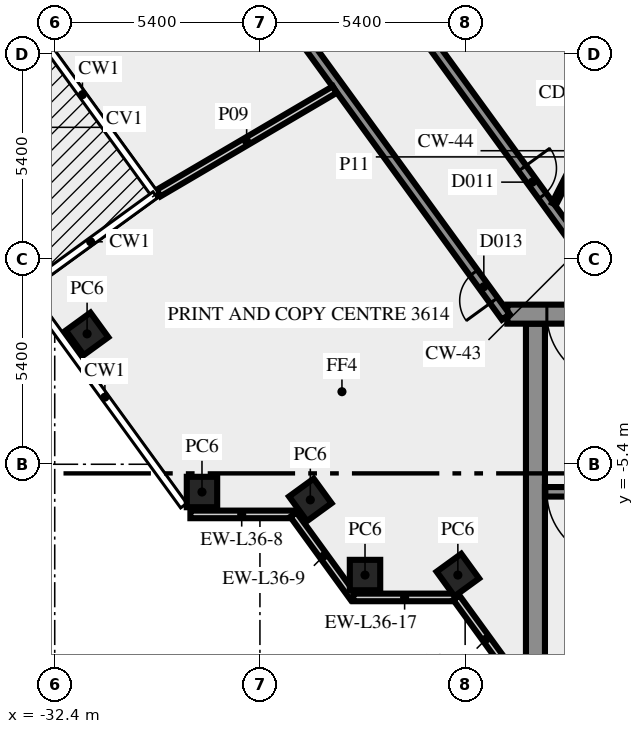
"""IFC4 building model, lengths in metres.
Left out: names, types, materials, properties, quantities, classifications, styles, units other than length and angle.
Written with IfcOpenShell. Run it as: python <this file> out.ifc"""

import sys

from ifc_helpers import new_model, si_unit, direction, frame, frame_2d, origin, origin_2d, place, context, subcontext, project, spatial, rectangle, extrude, element, fill, save


model = new_model("IFC4")
c1 = context("Model", 3, precision=1e-05, world=origin(), true_north=direction((0.0, 1.0)))
c2 = subcontext(c1, "Body", "Model", "MODEL_VIEW")
j1 = project(units=[si_unit("LENGTHUNIT", "METRE"), si_unit("PLANEANGLEUNIT", "RADIAN")], contexts=[c1])
p1 = place(None, origin())
s1 = spatial("IfcSite", under=j1, at=p1, CompositionType="ELEMENT")
p2 = place(p1, origin())
s2 = spatial("IfcBuilding", under=s1, at=p2, CompositionType="ELEMENT")
p3 = place(p2, frame((0.0, 0.0, 156.0)))
s3 = spatial("IfcBuildingStorey", under=s2, at=p3, CompositionType="ELEMENT", Elevation=156.0)
for number, where, z_axis, x_axis in (
    (1, (-31.548, -1.969, 0.0), (0.0, 0.0, 1.0), (0.588, -0.809, 0.0)),
    (2, (-28.525, -6.13, 0.0), (0.0, 0.0, 1.0), (1.0, 0.0, 0.0)),
    (3, (-25.674, -6.337, 0.0), (0.0, 0.0, 1.0), (0.588, -0.809, 0.0)),
    (4, (-24.235, -8.315, 0.0), (0.0, 0.0, 1.0), (1.0, 0.0, 0.0)),
    (5, (-21.792, -8.315, 0.0), (0.0, 0.0, 1.0), (0.588, -0.809, 0.0)),
):
    element("IfcColumn", number, at=place(p3, frame(where, z_axis=z_axis, x_axis=x_axis)), inside=s3, PredefinedType="COLUMN", context=c2, shape_type="SweptSolid", body=[
        extrude(rectangle(XDim=0.8, YDim=0.8, at=origin_2d()), origin(), (0.0, 0.0, 1.0), 3.65),
    ])
p4 = place(p3, frame((-28.83, -6.719, 0.0), z_axis=(0.0, 0.0, 1.0), x_axis=(1.0, 0.0, 0.0)))
e6 = element("IfcWall", 6, at=p4, inside=s3, PredefinedType="SOLIDWALL", context=c2, shape_type="SweptSolid", body=[
    extrude(rectangle(XDim=2.7, YDim=0.2, at=frame_2d((1.35, 0.0))), origin(), (0.0, 0.0, 1.0), 3.65),
])
p5 = place(p3, frame((-26.12, -6.724, 0.0), z_axis=(0.0, 0.0, 1.0), x_axis=(0.587720002413, -0.809064397168, 0.0)))
e7 = element("IfcWall", 7, at=p5, inside=s3, PredefinedType="SOLIDWALL", context=c2, shape_type="SweptSolid", body=[
    extrude(rectangle(XDim=2.7, YDim=0.2, at=frame_2d((1.35, 0.0))), origin(), (0.0, 0.0, 1.0), 3.65),
])
p6 = place(p3, frame((-24.543, -8.904, 0.0), z_axis=(0.0, 0.0, 1.0), x_axis=(1.0, 0.0, 0.0)))
e8 = element("IfcWall", 8, at=p6, inside=s3, PredefinedType="SOLIDWALL", context=c2, shape_type="SweptSolid", body=[
    extrude(rectangle(XDim=2.7, YDim=0.2, at=frame_2d((1.35, 0.0))), origin(), (0.0, 0.0, 1.0), 3.65),
])
p7 = place(p3, frame((-21.833, -8.909, 0.0), z_axis=(0.0, 0.0, 1.0), x_axis=(0.587766567315, -0.809030569476, 0.0)))
e9 = element("IfcWall", 9, at=p7, inside=s3, PredefinedType="SOLIDWALL", context=c2, shape_type="SweptSolid", body=[
    extrude(rectangle(XDim=2.688, YDim=0.2, at=frame_2d((1.344, 0.0))), origin(), (0.0, 0.0, 1.0), 3.65),
])
p8 = place(p3, frame((-19.75, -10.5, 0.0), z_axis=(0.0, 0.0, 1.0), x_axis=(0.0, 1.0, 0.0)))
e10 = element("IfcWall", 10, at=p8, inside=s3, PredefinedType="SHEAR", context=c2, shape_type="SweptSolid", body=[
    extrude(rectangle(XDim=8.8, YDim=0.5, at=frame_2d((4.4, 0.0))), origin(), (0.0, 0.0, 1.0), 3.65),
])
p9 = place(p3, frame((-11.45, -6.125, 0.0), z_axis=(0.0, 0.0, 1.0), x_axis=(-1.0, 0.0, 0.0)))
e11 = element("IfcWall", 11, at=p9, inside=s3, PredefinedType="SHEAR", context=c2, shape_type="SweptSolid", body=[
    extrude(rectangle(XDim=8.05, YDim=0.25, at=frame_2d((4.025, 0.0))), origin(), (0.0, 0.0, 1.0), 3.65),
])
p10 = place(p9, frame((6.2, 0.0, 0.0)))
e12 = element("IfcOpeningElement", 12, at=p10, cuts=e11, PredefinedType="OPENING", context=c2, shape_type="SweptSolid", body=[
    extrude(rectangle(XDim=1.8, YDim=2.1, at=frame_2d((0.9, 1.05))), frame((0.0, 0.135, 0.0), z_axis=(0.0, -1.0, 0.0), x_axis=(1.0, 0.0, 0.0)), (0.0, 0.0, 1.0), 0.27),
])
p11 = place(p3, frame((20.49, -1.45, 0.0), z_axis=(0.0, 0.0, 1.0), x_axis=(-1.0, 0.0, 0.0)))
e13 = element("IfcWall", 13, at=p11, inside=s3, PredefinedType="SHEAR", context=c2, shape_type="SweptSolid", body=[
    extrude(rectangle(XDim=40.98, YDim=0.5, at=frame_2d((20.49, 0.0))), origin(), (0.0, 0.0, 1.0), 3.65),
])
p12 = place(p11, frame((38.14, 0.0, 0.0)))
e14 = element("IfcOpeningElement", 14, at=p12, cuts=e13, PredefinedType="OPENING", context=c2, shape_type="SweptSolid", body=[
    extrude(rectangle(XDim=1.8, YDim=2.1, at=frame_2d((0.9, 1.05))), frame((0.0, 0.26, 0.0), z_axis=(0.0, -1.0, 0.0), x_axis=(1.0, 0.0, 0.0)), (0.0, 0.0, 1.0), 0.52),
])
p13 = place(p11, frame((35.89, 0.0, 0.0)))
e15 = element("IfcOpeningElement", 15, at=p13, cuts=e13, PredefinedType="OPENING", context=c2, shape_type="SweptSolid", body=[
    extrude(rectangle(XDim=0.9, YDim=2.1, at=frame_2d((0.45, 1.05))), frame((0.0, 0.26, 0.0), z_axis=(0.0, -1.0, 0.0), x_axis=(1.0, 0.0, 0.0)), (0.0, 0.0, 1.0), 0.52),
])
p14 = place(p11, frame((32.94, 0.0, 0.0)))
e16 = element("IfcOpeningElement", 16, at=p14, cuts=e13, PredefinedType="OPENING", context=c2, shape_type="SweptSolid", body=[
    extrude(rectangle(XDim=0.9, YDim=2.1, at=frame_2d((0.45, 1.05))), frame((0.0, 0.26, 0.0), z_axis=(0.0, -1.0, 0.0), x_axis=(1.0, 0.0, 0.0)), (0.0, 0.0, 1.0), 0.52),
])
p15 = place(p11, frame((28.802, 0.0, 0.0)))
e17 = element("IfcOpeningElement", 17, at=p15, cuts=e13, PredefinedType="OPENING", context=c2, shape_type="SweptSolid", body=[
    extrude(rectangle(XDim=0.9, YDim=2.1, at=frame_2d((0.45, 1.05))), frame((0.0, 0.26, 0.0), z_axis=(0.0, -1.0, 0.0), x_axis=(1.0, 0.0, 0.0)), (0.0, 0.0, 1.0), 0.52),
])
p16 = place(p11, frame((25.077, 0.0, 0.0)))
e18 = element("IfcOpeningElement", 18, at=p16, cuts=e13, PredefinedType="OPENING", context=c2, shape_type="SweptSolid", body=[
    extrude(rectangle(XDim=0.9, YDim=2.1, at=frame_2d((0.45, 1.05))), frame((0.0, 0.26, 0.0), z_axis=(0.0, -1.0, 0.0), x_axis=(1.0, 0.0, 0.0)), (0.0, 0.0, 1.0), 0.52),
])
p17 = place(p11, frame((21.765, 0.0, 0.0)))
e19 = element("IfcOpeningElement", 19, at=p17, cuts=e13, PredefinedType="OPENING", context=c2, shape_type="SweptSolid", body=[
    extrude(rectangle(XDim=2.0, YDim=2.1, at=frame_2d((1.0, 1.05))), frame((0.0, 0.26, 0.0), z_axis=(0.0, -1.0, 0.0), x_axis=(1.0, 0.0, 0.0)), (0.0, 0.0, 1.0), 0.52),
])
p18 = place(p11, frame((7.14, 0.0, 0.0)))
e20 = element("IfcOpeningElement", 20, at=p18, cuts=e13, PredefinedType="OPENING", context=c2, shape_type="SweptSolid", body=[
    extrude(rectangle(XDim=0.9, YDim=2.1, at=frame_2d((0.45, 1.05))), frame((0.0, 0.26, 0.0), z_axis=(0.0, -1.0, 0.0), x_axis=(1.0, 0.0, 0.0)), (0.0, 0.0, 1.0), 0.52),
])
p19 = place(p11, frame((5.028, 0.0, 0.0)))
e21 = element("IfcOpeningElement", 21, at=p19, cuts=e13, PredefinedType="OPENING", context=c2, shape_type="SweptSolid", body=[
    extrude(rectangle(XDim=0.8, YDim=2.1, at=frame_2d((0.4, 1.05))), frame((0.0, 0.26, 0.0), z_axis=(0.0, -1.0, 0.0), x_axis=(1.0, 0.0, 0.0)), (0.0, 0.0, 1.0), 0.52),
])
p20 = place(p11, frame((3.452, 0.0, 0.0)))
e22 = element("IfcOpeningElement", 22, at=p20, cuts=e13, PredefinedType="OPENING", context=c2, shape_type="SweptSolid", body=[
    extrude(rectangle(XDim=0.8, YDim=2.1, at=frame_2d((0.4, 1.05))), frame((0.0, 0.26, 0.0), z_axis=(0.0, -1.0, 0.0), x_axis=(1.0, 0.0, 0.0)), (0.0, 0.0, 1.0), 0.52),
])
p21 = place(p11, frame((1.04, 0.0, 0.0)))
e23 = element("IfcOpeningElement", 23, at=p21, cuts=e13, PredefinedType="OPENING", context=c2, shape_type="SweptSolid", body=[
    extrude(rectangle(XDim=1.8, YDim=2.1, at=frame_2d((0.9, 1.05))), frame((0.0, 0.26, 0.0), z_axis=(0.0, -1.0, 0.0), x_axis=(1.0, 0.0, 0.0)), (0.0, 0.0, 1.0), 0.52),
])
p22 = place(p3, frame((-20.531, -1.523, 0.0), z_axis=(0.0, 0.0, 1.0), x_axis=(-0.587781654618, 0.809019608226, 0.0)))
e24 = element("IfcWall", 24, at=p22, inside=s3, PredefinedType="SOLIDWALL", context=c2, shape_type="SweptSolid", body=[
    extrude(rectangle(XDim=33.911, YDim=0.25, at=frame_2d((16.956, 0.0))), origin(), (0.0, 0.0, 1.0), 3.65),
])
p23 = place(p22, frame((19.743, 0.0, 0.0)))
e25 = element("IfcOpeningElement", 25, at=p23, cuts=e24, PredefinedType="OPENING", context=c2, shape_type="SweptSolid", body=[
    extrude(rectangle(XDim=1.8, YDim=2.1, at=frame_2d((0.9, 1.05))), frame((0.0, 0.135, 0.0), z_axis=(0.0, -1.0, 0.0), x_axis=(1.0, 0.0, 0.0)), (0.0, 0.0, 1.0), 0.27),
])
p24 = place(p22, frame((0.533, 0.0, 0.0)))
e26 = element("IfcOpeningElement", 26, at=p24, cuts=e24, PredefinedType="OPENING", context=c2, shape_type="SweptSolid", body=[
    extrude(rectangle(XDim=0.9, YDim=2.1, at=frame_2d((0.45, 1.05))), frame((0.0, 0.135, 0.0), z_axis=(0.0, -1.0, 0.0), x_axis=(1.0, 0.0, 0.0)), (0.0, 0.0, 1.0), 0.27),
])
p25 = place(p3, frame((-38.32, 27.469, 0.0), z_axis=(0.0, 0.0, 1.0), x_axis=(0.587788021768, -0.809014982226, 0.0)))
e27 = element("IfcWall", 27, at=p25, inside=s3, PredefinedType="SOLIDWALL", context=c2, shape_type="SweptSolid", body=[
    extrude(rectangle(XDim=35.344, YDim=0.25, at=frame_2d((17.672, 0.0))), origin(), (0.0, 0.0, 1.0), 3.65),
])
p26 = place(p25, frame((31.003, 0.0, 0.0)))
e28 = element("IfcOpeningElement", 28, at=p26, cuts=e27, PredefinedType="OPENING", context=c2, shape_type="SweptSolid", body=[
    extrude(rectangle(XDim=0.9, YDim=2.1, at=frame_2d((0.45, 1.05))), frame((0.0, 0.135, 0.0), z_axis=(0.0, -1.0, 0.0), x_axis=(1.0, 0.0, 0.0)), (0.0, 0.0, 1.0), 0.27),
])
p27 = place(p25, frame((16.687, 0.0, 0.0)))
e29 = element("IfcOpeningElement", 29, at=p27, cuts=e27, PredefinedType="OPENING", context=c2, shape_type="SweptSolid", body=[
    extrude(rectangle(XDim=0.9, YDim=2.1, at=frame_2d((0.45, 1.05))), frame((0.0, 0.135, 0.0), z_axis=(0.0, -1.0, 0.0), x_axis=(1.0, 0.0, 0.0)), (0.0, 0.0, 1.0), 0.27),
])
p28 = place(p3, frame((-29.668, 1.735, 0.0), z_axis=(0.0, 0.0, 1.0), x_axis=(0.862172227296, 0.506615288439, 0.0)))
e30 = element("IfcWall", 30, at=p28, inside=s3, PredefinedType="SOLIDWALL", context=c2, shape_type="SweptSolid", body=[
    extrude(rectangle(XDim=5.377, YDim=0.2, at=frame_2d((2.688, 0.0))), origin(), (0.0, 0.0, 1.0), 3.65),
])
p29 = place(p3, frame((-19.261, 1.45, 0.0), z_axis=(0.0, 0.0, 1.0), x_axis=(0.453950796792, 0.891026752736, 0.0)))
e31 = element("IfcWall", 31, at=p29, inside=s3, PredefinedType="PARTITIONING", context=c2, shape_type="SweptSolid", body=[
    extrude(rectangle(XDim=2.778, YDim=0.12, at=frame_2d((1.389, 0.0))), origin(), (0.0, 0.0, 1.0), 3.65),
])
p30 = place(p10, origin())
e32 = element("IfcDoor", 32, at=p30, inside=s3, OperationType="DOUBLE_DOOR_SINGLE_SWING", PredefinedType="DOOR", context=c2, shape_type="SweptSolid", body=[
    extrude(rectangle(XDim=1.8, YDim=2.1, at=frame_2d((0.9, 1.05))), frame((0.0, 0.025, 0.0), z_axis=(0.0, -1.0, 0.0), x_axis=(1.0, 0.0, 0.0)), (0.0, 0.0, 1.0), 0.05),
])
fill(e12, e32)
p31 = place(p12, origin())
e33 = element("IfcDoor", 33, at=p31, inside=s3, OperationType="DOUBLE_DOOR_SINGLE_SWING", PredefinedType="DOOR", context=c2, shape_type="SweptSolid", body=[
    extrude(rectangle(XDim=1.8, YDim=2.1, at=frame_2d((0.9, 1.05))), frame((0.0, 0.025, 0.0), z_axis=(0.0, -1.0, 0.0), x_axis=(1.0, 0.0, 0.0)), (0.0, 0.0, 1.0), 0.05),
])
fill(e14, e33)
p32 = place(p26, origin())
e34 = element("IfcDoor", 34, at=p32, inside=s3, OperationType="SINGLE_SWING_RIGHT", PredefinedType="DOOR", context=c2, shape_type="SweptSolid", body=[
    extrude(rectangle(XDim=0.9, YDim=2.1, at=frame_2d((0.45, 1.05))), frame((0.0, 0.025, 0.0), z_axis=(0.0, -1.0, 0.0), x_axis=(1.0, 0.0, 0.0)), (0.0, 0.0, 1.0), 0.05),
])
fill(e28, e34)
p33 = place(p24, origin())
e35 = element("IfcDoor", 35, at=p33, inside=s3, OperationType="SINGLE_SWING_LEFT", PredefinedType="DOOR", context=c2, shape_type="SweptSolid", body=[
    extrude(rectangle(XDim=0.9, YDim=2.1, at=frame_2d((0.45, 1.05))), frame((0.0, 0.025, 0.0), z_axis=(0.0, -1.0, 0.0), x_axis=(1.0, 0.0, 0.0)), (0.0, 0.0, 1.0), 0.05),
])
fill(e26, e35)
save(model, sys.argv[1])
